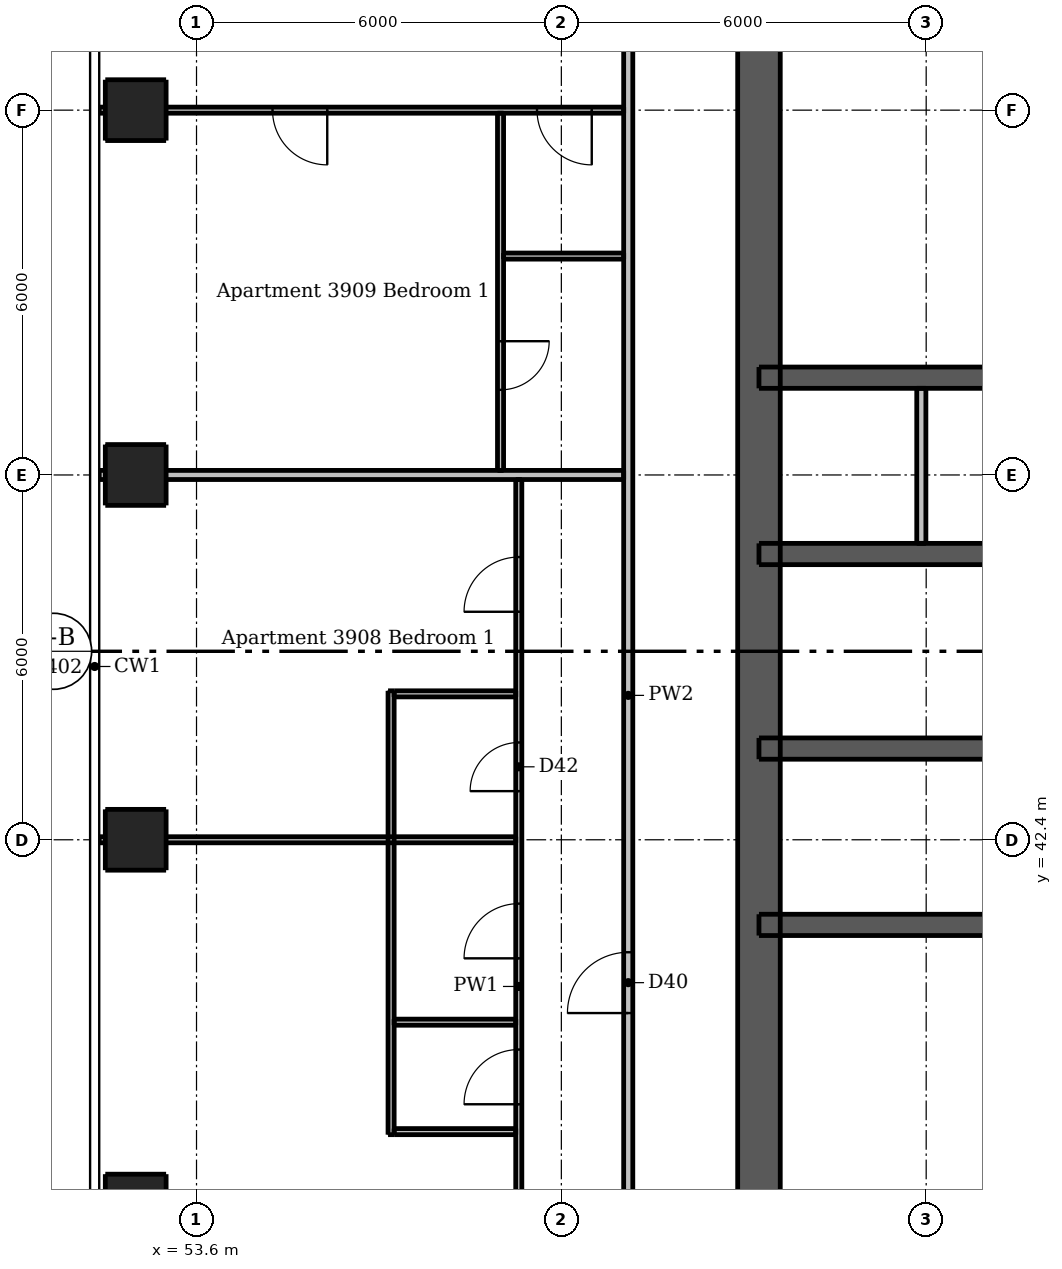
"""IFC4 building model, lengths in metres.
Left out: names, types, materials, properties, quantities, classifications, styles, units other than length and angle.
Written with IfcOpenShell. Run it as: python <this file> out.ifc"""

import sys

from ifc_helpers import new_model, si_unit, direction, frame, frame_2d, origin, origin_2d, place, context, subcontext, project, spatial, rectangle, extrude, element, fill, save


model = new_model("IFC4")
c1 = context("Model", 3, precision=1e-05, world=origin(), true_north=direction((0.0, 1.0)))
c2 = subcontext(c1, "Body", "Model", "MODEL_VIEW")
j1 = project(units=[si_unit("LENGTHUNIT", "METRE"), si_unit("PLANEANGLEUNIT", "RADIAN")], contexts=[c1])
p1 = place(None, origin())
s1 = spatial("IfcSite", under=j1, at=p1, CompositionType="ELEMENT")
p2 = place(p1, origin())
s2 = spatial("IfcBuilding", under=s1, at=p2, CompositionType="ELEMENT")
p3 = place(p2, frame((0.0, 0.0, 147.1)))
s3 = spatial("IfcBuildingStorey", under=s2, at=p3, CompositionType="ELEMENT", Elevation=147.1)
p4 = place(p3, frame((62.85, 33.5, 0.0), z_axis=(0.0, 0.0, 1.0), x_axis=(0.0, 1.0, 0.0)))
e1 = element("IfcWall", 1, at=p4, inside=s3, PredefinedType="SHEAR", context=c2, shape_type="SweptSolid", body=[
    extrude(rectangle(XDim=24.0, YDim=0.7, at=frame_2d((12.0, 0.0))), origin(), (0.0, 0.0, 1.0), 3.0),
])
p5 = place(p4, frame((11.2, 0.0, 0.0)))
e2 = element("IfcOpeningElement", 2, at=p5, cuts=e1, PredefinedType="OPENING", context=c2, shape_type="SweptSolid", body=[
    extrude(rectangle(XDim=1.6, YDim=2.1, at=frame_2d((0.8, 1.05))), frame((0.0, 0.36, 0.0), z_axis=(0.0, -1.0, 0.0), x_axis=(1.0, 0.0, 0.0)), (0.0, 0.0, 1.0), 0.72),
])
p6 = place(p3, frame((62.85, 41.0, 0.0), z_axis=(0.0, 0.0, 1.0), x_axis=(1.0, 0.0, 0.0)))
e3 = element("IfcWall", 3, at=p6, inside=s3, PredefinedType="SHEAR", context=c2, shape_type="SweptSolid", body=[
    extrude(rectangle(XDim=23.3, YDim=0.35, at=frame_2d((11.65, 0.0))), origin(), (0.0, 0.0, 1.0), 3.0),
])
p7 = place(p3, frame((62.85, 43.9, 0.0), z_axis=(0.0, 0.0, 1.0), x_axis=(1.0, 0.0, 0.0)))
e4 = element("IfcWall", 4, at=p7, inside=s3, PredefinedType="SHEAR", context=c2, shape_type="SweptSolid", body=[
    extrude(rectangle(XDim=23.3, YDim=0.35, at=frame_2d((11.65, 0.0))), origin(), (0.0, 0.0, 1.0), 3.0),
])
p8 = place(p7, frame((1.712, 0.0, 0.0)))
e5 = element("IfcOpeningElement", 5, at=p8, cuts=e4, PredefinedType="OPENING", context=c2, shape_type="SweptSolid", body=[
    extrude(rectangle(XDim=0.9, YDim=2.1, at=frame_2d((0.45, 1.05))), frame((0.0, 0.185, 0.0), z_axis=(0.0, -1.0, 0.0), x_axis=(1.0, 0.0, 0.0)), (0.0, 0.0, 1.0), 0.37),
])
p9 = place(p7, frame((20.688, 0.0, 0.0)))
e6 = element("IfcOpeningElement", 6, at=p9, cuts=e4, PredefinedType="OPENING", context=c2, shape_type="SweptSolid", body=[
    extrude(rectangle(XDim=0.9, YDim=2.1, at=frame_2d((0.45, 1.05))), frame((0.0, 0.185, 0.0), z_axis=(0.0, -1.0, 0.0), x_axis=(1.0, 0.0, 0.0)), (0.0, 0.0, 1.0), 0.37),
])
p10 = place(p7, frame((4.85, 0.0, 0.0)))
e7 = element("IfcOpeningElement", 7, at=p10, cuts=e4, PredefinedType="OPENING", context=c2, shape_type="SweptSolid", body=[
    extrude(rectangle(XDim=1.1, YDim=2.1, at=frame_2d((0.55, 1.05))), frame((0.0, 0.185, 0.0), z_axis=(0.0, -1.0, 0.0), x_axis=(1.0, 0.0, 0.0)), (0.0, 0.0, 1.0), 0.37),
])
p11 = place(p7, frame((7.35, 0.0, 0.0)))
e8 = element("IfcOpeningElement", 8, at=p11, cuts=e4, PredefinedType="OPENING", context=c2, shape_type="SweptSolid", body=[
    extrude(rectangle(XDim=1.1, YDim=2.1, at=frame_2d((0.55, 1.05))), frame((0.0, 0.185, 0.0), z_axis=(0.0, -1.0, 0.0), x_axis=(1.0, 0.0, 0.0)), (0.0, 0.0, 1.0), 0.37),
])
p12 = place(p7, frame((9.85, 0.0, 0.0)))
e9 = element("IfcOpeningElement", 9, at=p12, cuts=e4, PredefinedType="OPENING", context=c2, shape_type="SweptSolid", body=[
    extrude(rectangle(XDim=1.1, YDim=2.1, at=frame_2d((0.55, 1.05))), frame((0.0, 0.185, 0.0), z_axis=(0.0, -1.0, 0.0), x_axis=(1.0, 0.0, 0.0)), (0.0, 0.0, 1.0), 0.37),
])
p13 = place(p7, frame((12.35, 0.0, 0.0)))
e10 = element("IfcOpeningElement", 10, at=p13, cuts=e4, PredefinedType="OPENING", context=c2, shape_type="SweptSolid", body=[
    extrude(rectangle(XDim=1.1, YDim=2.1, at=frame_2d((0.55, 1.05))), frame((0.0, 0.185, 0.0), z_axis=(0.0, -1.0, 0.0), x_axis=(1.0, 0.0, 0.0)), (0.0, 0.0, 1.0), 0.37),
])
p14 = place(p7, frame((14.85, 0.0, 0.0)))
e11 = element("IfcOpeningElement", 11, at=p14, cuts=e4, PredefinedType="OPENING", context=c2, shape_type="SweptSolid", body=[
    extrude(rectangle(XDim=1.1, YDim=2.1, at=frame_2d((0.55, 1.05))), frame((0.0, 0.185, 0.0), z_axis=(0.0, -1.0, 0.0), x_axis=(1.0, 0.0, 0.0)), (0.0, 0.0, 1.0), 0.37),
])
p15 = place(p7, frame((17.35, 0.0, 0.0)))
e12 = element("IfcOpeningElement", 12, at=p15, cuts=e4, PredefinedType="OPENING", context=c2, shape_type="SweptSolid", body=[
    extrude(rectangle(XDim=1.1, YDim=2.1, at=frame_2d((0.55, 1.05))), frame((0.0, 0.185, 0.0), z_axis=(0.0, -1.0, 0.0), x_axis=(1.0, 0.0, 0.0)), (0.0, 0.0, 1.0), 0.37),
])
p16 = place(p3, frame((62.85, 47.1, 0.0), z_axis=(0.0, 0.0, 1.0), x_axis=(1.0, 0.0, 0.0)))
e13 = element("IfcWall", 13, at=p16, inside=s3, PredefinedType="SHEAR", context=c2, shape_type="SweptSolid", body=[
    extrude(rectangle(XDim=23.3, YDim=0.35, at=frame_2d((11.65, 0.0))), origin(), (0.0, 0.0, 1.0), 3.0),
])
p17 = place(p16, frame((1.06, 0.0, 0.0)))
e14 = element("IfcOpeningElement", 14, at=p17, cuts=e13, PredefinedType="OPENING", context=c2, shape_type="SweptSolid", body=[
    extrude(rectangle(XDim=0.9, YDim=2.1, at=frame_2d((0.45, 1.05))), frame((0.0, 0.185, 0.0), z_axis=(0.0, -1.0, 0.0), x_axis=(1.0, 0.0, 0.0)), (0.0, 0.0, 1.0), 0.37),
])
p18 = place(p16, frame((2.923, 0.0, 0.0)))
e15 = element("IfcOpeningElement", 15, at=p18, cuts=e13, PredefinedType="OPENING", context=c2, shape_type="SweptSolid", body=[
    extrude(rectangle(XDim=0.8, YDim=2.1, at=frame_2d((0.4, 1.05))), frame((0.0, 0.185, 0.0), z_axis=(0.0, -1.0, 0.0), x_axis=(1.0, 0.0, 0.0)), (0.0, 0.0, 1.0), 0.37),
])
p19 = place(p16, frame((20.688, 0.0, 0.0)))
e16 = element("IfcOpeningElement", 16, at=p19, cuts=e13, PredefinedType="OPENING", context=c2, shape_type="SweptSolid", body=[
    extrude(rectangle(XDim=0.9, YDim=2.1, at=frame_2d((0.45, 1.05))), frame((0.0, 0.185, 0.0), z_axis=(0.0, -1.0, 0.0), x_axis=(1.0, 0.0, 0.0)), (0.0, 0.0, 1.0), 0.37),
])
p20 = place(p3, frame((62.85, 50.0, 0.0), z_axis=(0.0, 0.0, 1.0), x_axis=(1.0, 0.0, 0.0)))
e17 = element("IfcWall", 17, at=p20, inside=s3, PredefinedType="SHEAR", context=c2, shape_type="SweptSolid", body=[
    extrude(rectangle(XDim=23.3, YDim=0.35, at=frame_2d((11.65, 0.0))), origin(), (0.0, 0.0, 1.0), 3.0),
])
for number, where, z_axis, x_axis in (
    (18, (52.6, 36.4, 0.0), (0.0, 0.0, 1.0), (1.0, 0.0, 0.0)),
    (19, (52.6, 42.4, 0.0), (0.0, 0.0, 1.0), (1.0, 0.0, 0.0)),
    (20, (52.6, 48.4, 0.0), (0.0, 0.0, 1.0), (1.0, 0.0, 0.0)),
    (21, (52.6, 54.4, 0.0), (0.0, 0.0, 1.0), (1.0, 0.0, 0.0)),
):
    element("IfcColumn", number, at=place(p3, frame(where, z_axis=z_axis, x_axis=x_axis)), inside=s3, PredefinedType="COLUMN", context=c2, shape_type="SweptSolid", body=[
        extrude(rectangle(XDim=1.0, YDim=1.0, at=origin_2d()), origin(), (0.0, 0.0, 1.0), 3.0),
    ])
p21 = place(p3, frame((65.52, 47.275, 0.0), z_axis=(0.0, 0.0, 1.0), x_axis=(0.0, 1.0, 0.0)))
e22 = element("IfcWall", 22, at=p21, inside=s3, PredefinedType="PLUMBINGWALL", context=c2, shape_type="SweptSolid", body=[
    extrude(rectangle(XDim=2.55, YDim=0.15, at=frame_2d((1.275, 0.0))), origin(), (0.0, 0.0, 1.0), 3.0),
])
p22 = place(p3, frame((56.8, 37.55, 0.0), z_axis=(0.0, 0.0, 1.0), x_axis=(0.0, 1.0, 0.0)))
e23 = element("IfcWall", 23, at=p22, inside=s3, PredefinedType="PARTITIONING", context=c2, shape_type="SweptSolid", body=[
    extrude(rectangle(XDim=7.3, YDim=0.1, at=frame_2d((3.65, 0.0))), origin(), (0.0, 0.0, 1.0), 3.0),
])
p23 = place(p3, frame((58.6, 54.35, 0.0), z_axis=(0.0, 0.0, 1.0), x_axis=(0.0, -1.0, 0.0)))
e24 = element("IfcWall", 24, at=p23, inside=s3, PredefinedType="PARTITIONING", context=c2, shape_type="SweptSolid", body=[
    extrude(rectangle(XDim=5.875, YDim=0.1, at=frame_2d((2.938, 0.0))), origin(), (0.0, 0.0, 1.0), 3.0),
])
p24 = place(p23, frame((3.75, 0.0, 0.0)))
e25 = element("IfcOpeningElement", 25, at=p24, cuts=e24, PredefinedType="OPENING", context=c2, shape_type="SweptSolid", body=[
    extrude(rectangle(XDim=0.8, YDim=2.1, at=frame_2d((0.4, 1.05))), frame((0.0, 0.06, 0.0), z_axis=(0.0, -1.0, 0.0), x_axis=(1.0, 0.0, 0.0)), (0.0, 0.0, 1.0), 0.12),
])
p25 = place(p3, frame((58.9, 31.65, 0.0), z_axis=(0.0, 0.0, 1.0), x_axis=(0.0, 1.0, 0.0)))
e26 = element("IfcWall", 26, at=p25, inside=s3, PredefinedType="PARTITIONING", context=c2, shape_type="SweptSolid", body=[
    extrude(rectangle(XDim=16.675, YDim=0.1, at=frame_2d((8.337, 0.0))), origin(), (0.0, 0.0, 1.0), 3.0),
])
p26 = place(p25, frame((2.8, 0.0, 0.0)))
e27 = element("IfcOpeningElement", 27, at=p26, cuts=e26, PredefinedType="OPENING", context=c2, shape_type="SweptSolid", body=[
    extrude(rectangle(XDim=0.9, YDim=2.1, at=frame_2d((0.45, 1.05))), frame((0.0, 0.06, 0.0), z_axis=(0.0, -1.0, 0.0), x_axis=(1.0, 0.0, 0.0)), (0.0, 0.0, 1.0), 0.12),
])
p27 = place(p25, frame((8.8, 0.0, 0.0)))
e28 = element("IfcOpeningElement", 28, at=p27, cuts=e26, PredefinedType="OPENING", context=c2, shape_type="SweptSolid", body=[
    extrude(rectangle(XDim=0.9, YDim=2.1, at=frame_2d((0.45, 1.05))), frame((0.0, 0.06, 0.0), z_axis=(0.0, -1.0, 0.0), x_axis=(1.0, 0.0, 0.0)), (0.0, 0.0, 1.0), 0.12),
])
p28 = place(p25, frame((6.4, 0.0, 0.0)))
e29 = element("IfcOpeningElement", 29, at=p28, cuts=e26, PredefinedType="OPENING", context=c2, shape_type="SweptSolid", body=[
    extrude(rectangle(XDim=0.9, YDim=2.1, at=frame_2d((0.45, 1.05))), frame((0.0, 0.06, 0.0), z_axis=(0.0, -1.0, 0.0), x_axis=(1.0, 0.0, 0.0)), (0.0, 0.0, 1.0), 0.12),
])
p29 = place(p25, frame((14.5, 0.0, 0.0)))
e30 = element("IfcOpeningElement", 30, at=p29, cuts=e26, PredefinedType="OPENING", context=c2, shape_type="SweptSolid", body=[
    extrude(rectangle(XDim=0.9, YDim=2.1, at=frame_2d((0.45, 1.05))), frame((0.0, 0.06, 0.0), z_axis=(0.0, -1.0, 0.0), x_axis=(1.0, 0.0, 0.0)), (0.0, 0.0, 1.0), 0.12),
])
p30 = place(p25, frame((11.55, 0.0, 0.0)))
e31 = element("IfcOpeningElement", 31, at=p30, cuts=e26, PredefinedType="OPENING", context=c2, shape_type="SweptSolid", body=[
    extrude(rectangle(XDim=0.8, YDim=2.1, at=frame_2d((0.4, 1.05))), frame((0.0, 0.06, 0.0), z_axis=(0.0, -1.0, 0.0), x_axis=(1.0, 0.0, 0.0)), (0.0, 0.0, 1.0), 0.12),
])
p31 = place(p3, frame((60.625, 54.4, 0.0), z_axis=(0.0, 0.0, 1.0), x_axis=(-1.0, 0.0, 0.0)))
e32 = element("IfcWall", 32, at=p31, inside=s3, PredefinedType="PARTITIONING", context=c2, shape_type="SweptSolid", body=[
    extrude(rectangle(XDim=8.625, YDim=0.1, at=frame_2d((4.312, 0.0))), origin(), (0.0, 0.0, 1.0), 2.466),
])
p32 = place(p31, frame((0.525, 0.0, 0.0)))
e33 = element("IfcOpeningElement", 33, at=p32, cuts=e32, PredefinedType="OPENING", context=c2, shape_type="SweptSolid", body=[
    extrude(rectangle(XDim=0.9, YDim=2.1, at=frame_2d((0.45, 1.05))), frame((0.0, 0.06, 0.0), z_axis=(0.0, -1.0, 0.0), x_axis=(1.0, 0.0, 0.0)), (0.0, 0.0, 1.0), 0.12),
])
p33 = place(p31, frame((4.875, 0.0, 0.0)))
e34 = element("IfcOpeningElement", 34, at=p33, cuts=e32, PredefinedType="OPENING", context=c2, shape_type="SweptSolid", body=[
    extrude(rectangle(XDim=0.9, YDim=2.1, at=frame_2d((0.45, 1.05))), frame((0.0, 0.06, 0.0), z_axis=(0.0, -1.0, 0.0), x_axis=(1.0, 0.0, 0.0)), (0.0, 0.0, 1.0), 0.12),
])
p34 = place(p3, frame((58.65, 52.0, 0.0), z_axis=(0.0, 0.0, 1.0), x_axis=(1.0, 0.0, 0.0)))
e35 = element("IfcWall", 35, at=p34, inside=s3, PredefinedType="PARTITIONING", context=c2, shape_type="SweptSolid", body=[
    extrude(rectangle(XDim=1.975, YDim=0.1, at=frame_2d((0.988, 0.0))), origin(), (0.0, 0.0, 1.0), 3.0),
])
p35 = place(p3, frame((56.85, 44.8, 0.0), z_axis=(0.0, 0.0, 1.0), x_axis=(1.0, 0.0, 0.0)))
e36 = element("IfcWall", 36, at=p35, inside=s3, PredefinedType="PARTITIONING", context=c2, shape_type="SweptSolid", body=[
    extrude(rectangle(XDim=2.0, YDim=0.1, at=frame_2d((1.0, 0.0))), origin(), (0.0, 0.0, 1.0), 3.0),
])
p36 = place(p3, frame((52.0, 42.4, 0.0), z_axis=(0.0, 0.0, 1.0), x_axis=(1.0, 0.0, 0.0)))
e37 = element("IfcWall", 37, at=p36, inside=s3, PredefinedType="PARTITIONING", context=c2, shape_type="SweptSolid", body=[
    extrude(rectangle(XDim=6.85, YDim=0.1, at=frame_2d((3.425, 0.0))), origin(), (0.0, 0.0, 1.0), 2.466),
])
for number, where, z_axis, x_axis in (
    (38, (56.85, 39.4, 0.0), (0.0, 0.0, 1.0), (1.0, 0.0, 0.0)),
    (39, (56.85, 37.6, 0.0), (0.0, 0.0, 1.0), (1.0, 0.0, 0.0)),
):
    element("IfcWall", number, at=place(p3, frame(where, z_axis=z_axis, x_axis=x_axis)), inside=s3, PredefinedType="PARTITIONING", context=c2, shape_type="SweptSolid", body=[
        extrude(rectangle(XDim=2.0, YDim=0.1, at=frame_2d((1.0, 0.0))), origin(), (0.0, 0.0, 1.0), 3.0),
    ])
p37 = place(p3, frame((60.7, 30.325, 0.0), z_axis=(0.0, 0.0, 1.0), x_axis=(0.0, 1.0, 0.0)))
e40 = element("IfcWall", 40, at=p37, inside=s3, PredefinedType="PARTITIONING", context=c2, shape_type="SweptSolid", body=[
    extrude(rectangle(XDim=28.9, YDim=0.15, at=frame_2d((14.45, 0.0))), origin(), (0.0, 0.0, 1.0), 3.0),
])
p38 = place(p37, frame((9.225, 0.0, 0.0)))
e41 = element("IfcOpeningElement", 41, at=p38, cuts=e40, PredefinedType="OPENING", context=c2, shape_type="SweptSolid", body=[
    extrude(rectangle(XDim=1.0, YDim=2.1, at=frame_2d((0.5, 1.05))), frame((0.0, 0.085, 0.0), z_axis=(0.0, -1.0, 0.0), x_axis=(1.0, 0.0, 0.0)), (0.0, 0.0, 1.0), 0.17),
])
p39 = place(p37, frame((26.025, 0.0, 0.0)))
e42 = element("IfcOpeningElement", 42, at=p39, cuts=e40, PredefinedType="OPENING", context=c2, shape_type="SweptSolid", body=[
    extrude(rectangle(XDim=1.0, YDim=2.1, at=frame_2d((0.5, 1.05))), frame((0.0, 0.085, 0.0), z_axis=(0.0, -1.0, 0.0), x_axis=(1.0, 0.0, 0.0)), (0.0, 0.0, 1.0), 0.17),
])
p40 = place(p3, frame((52.0, 48.4, 0.0), z_axis=(0.0, 0.0, 1.0), x_axis=(1.0, 0.0, 0.0)))
e43 = element("IfcWall", 43, at=p40, inside=s3, PredefinedType="PARTITIONING", context=c2, shape_type="SweptSolid", body=[
    extrude(rectangle(XDim=8.625, YDim=0.15, at=frame_2d((4.312, 0.0))), origin(), (0.0, 0.0, 1.0), 2.466),
])
p41 = place(p5, origin())
e44 = element("IfcDoor", 44, at=p41, inside=s3, OperationType="DOUBLE_DOOR_SINGLE_SWING", PredefinedType="DOOR", context=c2, shape_type="SweptSolid", body=[
    extrude(rectangle(XDim=1.6, YDim=2.1, at=frame_2d((0.8, 1.05))), frame((0.0, -0.288, 0.0), z_axis=(0.0, -1.0, 0.0), x_axis=(1.0, 0.0, 0.0)), (0.0, 0.0, 1.0), 0.05),
])
fill(e2, e44)
p42 = place(p8, origin())
e45 = element("IfcDoor", 45, at=p42, inside=s3, OperationType="SINGLE_SWING_LEFT", PredefinedType="DOOR", context=c2, shape_type="SweptSolid", body=[
    extrude(rectangle(XDim=0.9, YDim=2.1, at=frame_2d((0.45, 1.05))), frame((0.0, -0.112, 0.0), z_axis=(0.0, -1.0, 0.0), x_axis=(1.0, 0.0, 0.0)), (0.0, 0.0, 1.0), 0.05),
])
fill(e5, e45)
p43 = place(p17, origin())
e46 = element("IfcDoor", 46, at=p43, inside=s3, OperationType="SINGLE_SWING_LEFT", PredefinedType="DOOR", context=c2, shape_type="SweptSolid", body=[
    extrude(rectangle(XDim=0.9, YDim=2.1, at=frame_2d((0.45, 1.05))), frame((0.0, 0.163, 0.0), z_axis=(0.0, -1.0, 0.0), x_axis=(1.0, 0.0, 0.0)), (0.0, 0.0, 1.0), 0.05),
])
fill(e14, e46)
p44 = place(p18, origin())
e47 = element("IfcDoor", 47, at=p44, inside=s3, OperationType="SINGLE_SWING_RIGHT", PredefinedType="DOOR", context=c2, shape_type="SweptSolid", body=[
    extrude(rectangle(XDim=0.8, YDim=2.1, at=frame_2d((0.4, 1.05))), frame((0.0, 0.163, 0.0), z_axis=(0.0, -1.0, 0.0), x_axis=(1.0, 0.0, 0.0)), (0.0, 0.0, 1.0), 0.05),
])
fill(e15, e47)
p45 = place(p38, origin())
e48 = element("IfcDoor", 48, at=p45, inside=s3, OperationType="SINGLE_SWING_LEFT", PredefinedType="DOOR", context=c2, shape_type="SweptSolid", body=[
    extrude(rectangle(XDim=1.0, YDim=2.1, at=frame_2d((0.5, 1.05))), frame((0.0, 0.025, 0.0), z_axis=(0.0, -1.0, 0.0), x_axis=(1.0, 0.0, 0.0)), (0.0, 0.0, 1.0), 0.05),
])
fill(e41, e48)
p46 = place(p27, origin())
e49 = element("IfcDoor", 49, at=p46, inside=s3, OperationType="SINGLE_SWING_LEFT", PredefinedType="DOOR", context=c2, shape_type="SweptSolid", body=[
    extrude(rectangle(XDim=0.9, YDim=2.1, at=frame_2d((0.45, 1.05))), frame((0.0, 0.025, 0.0), z_axis=(0.0, -1.0, 0.0), x_axis=(1.0, 0.0, 0.0)), (0.0, 0.0, 1.0), 0.05),
])
fill(e28, e49)
p47 = place(p28, origin())
e50 = element("IfcDoor", 50, at=p47, inside=s3, OperationType="SINGLE_SWING_LEFT", PredefinedType="DOOR", context=c2, shape_type="SweptSolid", body=[
    extrude(rectangle(XDim=0.9, YDim=2.1, at=frame_2d((0.45, 1.05))), frame((0.0, 0.025, 0.0), z_axis=(0.0, -1.0, 0.0), x_axis=(1.0, 0.0, 0.0)), (0.0, 0.0, 1.0), 0.05),
])
fill(e29, e50)
p48 = place(p29, origin())
e51 = element("IfcDoor", 51, at=p48, inside=s3, OperationType="SINGLE_SWING_LEFT", PredefinedType="DOOR", context=c2, shape_type="SweptSolid", body=[
    extrude(rectangle(XDim=0.9, YDim=2.1, at=frame_2d((0.45, 1.05))), frame((0.0, 0.025, 0.0), z_axis=(0.0, -1.0, 0.0), x_axis=(1.0, 0.0, 0.0)), (0.0, 0.0, 1.0), 0.05),
])
fill(e30, e51)
p49 = place(p30, origin())
e52 = element("IfcDoor", 52, at=p49, inside=s3, OperationType="SINGLE_SWING_LEFT", PredefinedType="DOOR", context=c2, shape_type="SweptSolid", body=[
    extrude(rectangle(XDim=0.8, YDim=2.1, at=frame_2d((0.4, 1.05))), frame((0.0, 0.025, 0.0), z_axis=(0.0, -1.0, 0.0), x_axis=(1.0, 0.0, 0.0)), (0.0, 0.0, 1.0), 0.05),
])
fill(e31, e52)
p50 = place(p32, origin())
e53 = element("IfcDoor", 53, at=p50, inside=s3, OperationType="SINGLE_SWING_LEFT", PredefinedType="DOOR", context=c2, shape_type="SweptSolid", body=[
    extrude(rectangle(XDim=0.9, YDim=2.1, at=frame_2d((0.45, 1.05))), frame((0.0, 0.025, 0.0), z_axis=(0.0, -1.0, 0.0), x_axis=(1.0, 0.0, 0.0)), (0.0, 0.0, 1.0), 0.05),
])
fill(e33, e53)
p51 = place(p33, origin())
e54 = element("IfcDoor", 54, at=p51, inside=s3, OperationType="SINGLE_SWING_LEFT", PredefinedType="DOOR", context=c2, shape_type="SweptSolid", body=[
    extrude(rectangle(XDim=0.9, YDim=2.1, at=frame_2d((0.45, 1.05))), frame((0.0, 0.025, 0.0), z_axis=(0.0, -1.0, 0.0), x_axis=(1.0, 0.0, 0.0)), (0.0, 0.0, 1.0), 0.05),
])
fill(e34, e54)
p52 = place(p24, origin())
e55 = element("IfcDoor", 55, at=p52, inside=s3, OperationType="SINGLE_SWING_LEFT", PredefinedType="DOOR", context=c2, shape_type="SweptSolid", body=[
    extrude(rectangle(XDim=0.8, YDim=2.1, at=frame_2d((0.4, 1.05))), frame((0.0, 0.025, 0.0), z_axis=(0.0, -1.0, 0.0), x_axis=(1.0, 0.0, 0.0)), (0.0, 0.0, 1.0), 0.05),
])
fill(e25, e55)
save(model, sys.argv[1])
